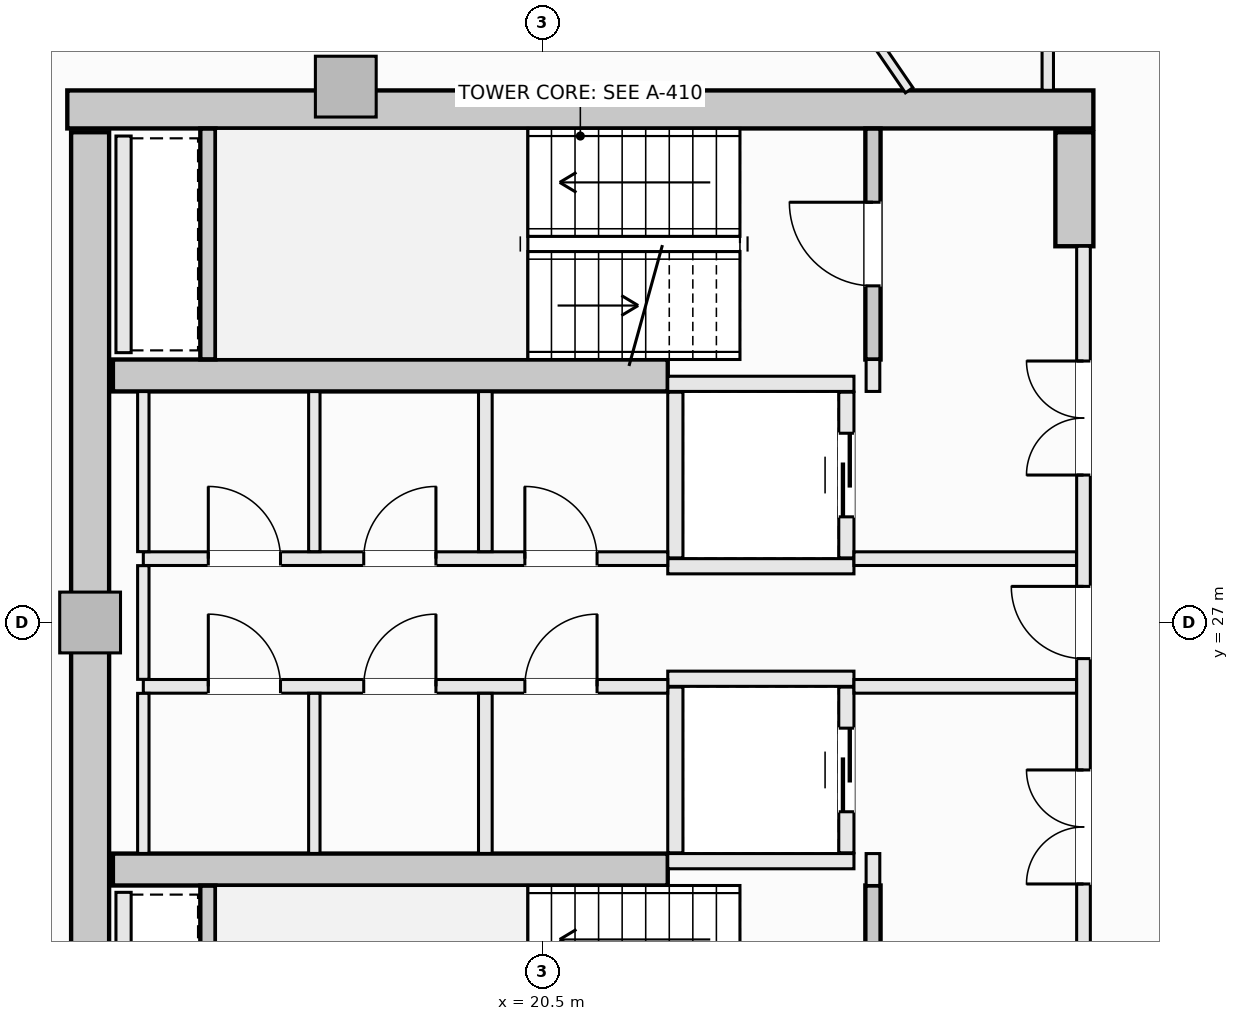
"""IFC4 building model, lengths in metres.
Left out: names, types, materials, properties, quantities, classifications, styles, units other than length and angle.
Written with IfcOpenShell. Run it as: python <this file> out.ifc"""

import sys

from ifc_helpers import new_model, si_unit, direction, frame, frame_2d, origin, origin_2d, place, context, subcontext, project, spatial, rectangle, extrude, element, fill, save


model = new_model("IFC4")
c1 = context("Model", 3, precision=1e-05, world=origin(), true_north=direction((0.0, 1.0)))
c2 = subcontext(c1, "Body", "Model", "MODEL_VIEW")
j1 = project(units=[si_unit("LENGTHUNIT", "METRE"), si_unit("PLANEANGLEUNIT", "RADIAN")], contexts=[c1])
p1 = place(None, origin())
s1 = spatial("IfcSite", under=j1, at=p1, CompositionType="ELEMENT")
p2 = place(p1, origin())
s2 = spatial("IfcBuilding", under=s1, at=p2, CompositionType="ELEMENT")
p3 = place(p2, frame((0.0, 0.0, 206.3)))
s3 = spatial("IfcBuildingStorey", under=s2, at=p3, CompositionType="ELEMENT", Elevation=206.3)
p4 = place(p3, frame((14.25, 33.75, -0.27), z_axis=(0.0, 0.0, 1.0), x_axis=(1.0, 0.0, 0.0)))
e1 = element("IfcWall", 1, at=p4, inside=s3, PredefinedType="SHEAR", context=c2, shape_type="SweptSolid", body=[
    extrude(rectangle(XDim=13.5, YDim=0.5, at=frame_2d((6.75, 0.0))), origin(), (0.0, 0.0, 1.0), 3.3),
])
p5 = place(p3, frame((14.55, 20.55, -0.27), z_axis=(0.0, 0.0, 1.0), x_axis=(0.0, 1.0, 0.0)))
e2 = element("IfcWall", 2, at=p5, inside=s3, PredefinedType="SHEAR", context=c2, shape_type="SweptSolid", body=[
    extrude(rectangle(XDim=12.9, YDim=0.5, at=frame_2d((6.45, 0.0))), origin(), (0.0, 0.0, 1.0), 3.3),
])
p6 = place(p3, frame((27.5, 31.95, -0.27), z_axis=(0.0, 0.0, 1.0), x_axis=(0.0, 1.0, 0.0)))
e3 = element("IfcWall", 3, at=p6, inside=s3, PredefinedType="SHEAR", context=c2, shape_type="SweptSolid", body=[
    extrude(rectangle(XDim=1.5, YDim=0.5, at=frame_2d((0.75, 0.0))), origin(), (0.0, 0.0, 1.0), 3.3),
])
for number, where, z_axis, x_axis in (
    (4, (14.85, 30.25, -0.27), (0.0, 0.0, 1.0), (1.0, 0.0, 0.0)),
    (5, (14.85, 23.75, -0.27), (0.0, 0.0, 1.0), (1.0, 0.0, 0.0)),
):
    element("IfcWall", number, at=place(p3, frame(where, z_axis=z_axis, x_axis=x_axis)), inside=s3, PredefinedType="SHEAR", context=c2, shape_type="SweptSolid", body=[
        extrude(rectangle(XDim=7.3, YDim=0.42, at=frame_2d((3.65, 0.0))), origin(), (0.0, 0.0, 1.0), 3.3),
    ])
for number, where, z_axis, x_axis in (
    (6, (17.914, 34.05, -0.27), (0.0, 0.0, 1.0), (1.0, 0.0, 0.0)),
    (7, (14.55, 27.0, -0.27), (0.0, 0.0, 1.0), (1.0, 0.0, 0.0)),
):
    element("IfcColumn", number, at=place(p3, frame(where, z_axis=z_axis, x_axis=x_axis)), inside=s3, PredefinedType="PILASTER", context=c2, shape_type="SweptSolid", body=[
        extrude(rectangle(XDim=0.8, YDim=0.8, at=origin_2d()), origin(), (0.0, 0.0, 1.0), 3.3),
    ])
p7 = place(p3, frame((24.85, 30.46, -0.27), z_axis=(0.0, 0.0, 1.0), x_axis=(0.0, 1.0, 0.0)))
e8 = element("IfcWall", 8, at=p7, inside=s3, PredefinedType="SHEAR", context=c2, shape_type="SweptSolid", body=[
    extrude(rectangle(XDim=3.038, YDim=0.2, at=frame_2d((1.519, 0.0))), origin(), (0.0, 0.0, 1.0), 3.3),
])
p8 = place(p7, frame((0.969, 0.0, 0.27)))
e9 = element("IfcOpeningElement", 9, at=p8, cuts=e8, PredefinedType="OPENING", context=c2, shape_type="SweptSolid", body=[
    extrude(rectangle(XDim=1.1, YDim=2.15, at=frame_2d((0.55, 1.075))), frame((0.0, 0.11, 0.0), z_axis=(0.0, -1.0, 0.0), x_axis=(1.0, 0.0, 0.0)), (0.0, 0.0, 1.0), 0.22),
])
p9 = place(p3, frame((16.1, 30.462, -0.27), z_axis=(0.0, 0.0, 1.0), x_axis=(0.0, 1.0, 0.0)))
e10 = element("IfcWall", 10, at=p9, inside=s3, PredefinedType="SHEAR", context=c2, shape_type="SweptSolid", body=[
    extrude(rectangle(XDim=3.036, YDim=0.2, at=frame_2d((1.518, 0.0))), origin(), (0.0, 0.0, 1.0), 3.3),
])
p10 = place(p3, frame((24.85, 20.502, -0.27), z_axis=(0.0, 0.0, 1.0), x_axis=(0.0, 1.0, 0.0)))
e11 = element("IfcWall", 11, at=p10, inside=s3, PredefinedType="SHEAR", context=c2, shape_type="SweptSolid", body=[
    extrude(rectangle(XDim=3.038, YDim=0.2, at=frame_2d((1.519, 0.0))), origin(), (0.0, 0.0, 1.0), 3.3),
])
p11 = place(p10, frame((0.969, 0.0, 0.27)))
e12 = element("IfcOpeningElement", 12, at=p11, cuts=e11, PredefinedType="OPENING", context=c2, shape_type="SweptSolid", body=[
    extrude(rectangle(XDim=1.1, YDim=2.15, at=frame_2d((0.55, 1.075))), frame((0.0, 0.11, 0.0), z_axis=(0.0, -1.0, 0.0), x_axis=(1.0, 0.0, 0.0)), (0.0, 0.0, 1.0), 0.22),
])
p12 = place(p3, frame((16.1, 20.502, -0.27), z_axis=(0.0, 0.0, 1.0), x_axis=(0.0, 1.0, 0.0)))
e13 = element("IfcWall", 13, at=p12, inside=s3, PredefinedType="SHEAR", context=c2, shape_type="SweptSolid", body=[
    extrude(rectangle(XDim=3.036, YDim=0.2, at=frame_2d((1.518, 0.0))), origin(), (0.0, 0.0, 1.0), 3.3),
])
for number, where, z_axis, x_axis in (
    (14, (22.15, 30.14, 0.0), (0.0, 0.0, 1.0), (1.0, 0.0, 0.0)),
    (15, (22.15, 27.74, 0.0), (0.0, 0.0, 1.0), (1.0, 0.0, 0.0)),
):
    element("IfcWall", number, at=place(p3, frame(where, z_axis=z_axis, x_axis=x_axis)), inside=s3, PredefinedType="SOLIDWALL", context=c2, shape_type="SweptSolid", body=[
        extrude(rectangle(XDim=2.45, YDim=0.2, at=frame_2d((1.225, 0.0))), origin(), (0.0, 0.0, 1.0), 3.03),
    ])
p13 = place(p3, frame((22.25, 27.85, 0.0), z_axis=(0.0, 0.0, 1.0), x_axis=(0.0, 1.0, 0.0)))
e16 = element("IfcWall", 16, at=p13, inside=s3, PredefinedType="SOLIDWALL", context=c2, shape_type="SweptSolid", body=[
    extrude(rectangle(XDim=2.18, YDim=0.2, at=frame_2d((1.09, 0.0))), origin(), (0.0, 0.0, 1.0), 3.03),
])
p14 = place(p3, frame((24.5, 27.85, 0.0), z_axis=(0.0, 0.0, 1.0), x_axis=(0.0, 1.0, 0.0)))
e17 = element("IfcWall", 17, at=p14, inside=s3, PredefinedType="SOLIDWALL", context=c2, shape_type="SweptSolid", body=[
    extrude(rectangle(XDim=2.18, YDim=0.2, at=frame_2d((1.09, 0.0))), origin(), (0.0, 0.0, 1.0), 3.03),
])
p15 = place(p14, frame((0.54, 0.0, 0.0)))
e18 = element("IfcOpeningElement", 18, at=p15, cuts=e17, PredefinedType="OPENING", context=c2, shape_type="SweptSolid", body=[
    extrude(rectangle(XDim=1.1, YDim=2.2, at=frame_2d((0.55, 1.1))), frame((0.0, 0.11, 0.0), z_axis=(0.0, -1.0, 0.0), x_axis=(1.0, 0.0, 0.0)), (0.0, 0.0, 1.0), 0.22),
])
for number, where, z_axis, x_axis in (
    (19, (22.15, 26.26, 0.0), (0.0, 0.0, 1.0), (1.0, 0.0, 0.0)),
    (20, (22.15, 23.86, 0.0), (0.0, 0.0, 1.0), (1.0, 0.0, 0.0)),
):
    element("IfcWall", number, at=place(p3, frame(where, z_axis=z_axis, x_axis=x_axis)), inside=s3, PredefinedType="SOLIDWALL", context=c2, shape_type="SweptSolid", body=[
        extrude(rectangle(XDim=2.45, YDim=0.2, at=frame_2d((1.225, 0.0))), origin(), (0.0, 0.0, 1.0), 3.03),
    ])
p16 = place(p3, frame((22.25, 23.97, 0.0), z_axis=(0.0, 0.0, 1.0), x_axis=(0.0, 1.0, 0.0)))
e21 = element("IfcWall", 21, at=p16, inside=s3, PredefinedType="SOLIDWALL", context=c2, shape_type="SweptSolid", body=[
    extrude(rectangle(XDim=2.18, YDim=0.2, at=frame_2d((1.09, 0.0))), origin(), (0.0, 0.0, 1.0), 3.03),
])
p17 = place(p3, frame((24.5, 23.97, 0.0), z_axis=(0.0, 0.0, 1.0), x_axis=(0.0, 1.0, 0.0)))
e22 = element("IfcWall", 22, at=p17, inside=s3, PredefinedType="SOLIDWALL", context=c2, shape_type="SweptSolid", body=[
    extrude(rectangle(XDim=2.18, YDim=0.2, at=frame_2d((1.09, 0.0))), origin(), (0.0, 0.0, 1.0), 3.03),
])
p18 = place(p17, frame((0.54, 0.0, 0.0)))
e23 = element("IfcOpeningElement", 23, at=p18, cuts=e22, PredefinedType="OPENING", context=c2, shape_type="SweptSolid", body=[
    extrude(rectangle(XDim=1.1, YDim=2.2, at=frame_2d((0.55, 1.1))), frame((0.0, 0.11, 0.0), z_axis=(0.0, -1.0, 0.0), x_axis=(1.0, 0.0, 0.0)), (0.0, 0.0, 1.0), 0.22),
])
for number, where, z_axis, x_axis in (
    (24, (14.99, 30.55, 0.0), (0.0, 0.0, 1.0), (0.0, 1.0, 0.0)),
    (25, (14.99, 20.6, 0.0), (0.0, 0.0, 1.0), (0.0, 1.0, 0.0)),
):
    element("IfcWall", number, at=place(p3, frame(where, z_axis=z_axis, x_axis=x_axis)), inside=s3, PredefinedType="SOLIDWALL", context=c2, shape_type="SweptSolid", body=[
        extrude(rectangle(XDim=2.85, YDim=0.2, at=frame_2d((1.425, 0.0))), origin(), (0.0, 0.0, 1.0), 3.03),
    ])
for number, where, z_axis, x_axis in (
    (26, (24.85, 23.54, 0.0), (0.0, 0.0, 1.0), (0.0, 1.0, 0.0)),
    (27, (24.85, 30.04, 0.0), (0.0, 0.0, 1.0), (0.0, 1.0, 0.0)),
):
    element("IfcWall", number, at=place(p3, frame(where, z_axis=z_axis, x_axis=x_axis)), inside=s3, PredefinedType="SOLIDWALL", context=c2, shape_type="SweptSolid", body=[
        extrude(rectangle(XDim=0.42, YDim=0.18, at=frame_2d((0.21, 0.0))), origin(), (0.0, 0.0, 1.0), 3.03),
    ])
p19 = place(p3, frame((27.62, 22.05, 0.0), z_axis=(0.0, 0.0, 1.0), x_axis=(0.0, 1.0, 0.0)))
e28 = element("IfcWall", 28, at=p19, inside=s3, PredefinedType="SOLIDWALL", context=c2, shape_type="SweptSolid", body=[
    extrude(rectangle(XDim=9.9, YDim=0.18, at=frame_2d((4.95, 0.0))), origin(), (0.0, 0.0, 1.0), 3.03),
])
p20 = place(p19, frame((4.475, 0.0, 0.0)))
e29 = element("IfcOpeningElement", 29, at=p20, cuts=e28, PredefinedType="OPENING", context=c2, shape_type="SweptSolid", body=[
    extrude(rectangle(XDim=0.95, YDim=2.1, at=frame_2d((0.475, 1.05))), frame((0.0, 0.1, 0.0), z_axis=(0.0, -1.0, 0.0), x_axis=(1.0, 0.0, 0.0)), (0.0, 0.0, 1.0), 0.2),
])
p21 = place(p19, frame((6.89, 0.0, 0.0)))
e30 = element("IfcOpeningElement", 30, at=p21, cuts=e28, PredefinedType="OPENING", context=c2, shape_type="SweptSolid", body=[
    extrude(rectangle(XDim=1.5, YDim=2.2, at=frame_2d((0.75, 1.1))), frame((0.0, 0.1, 0.0), z_axis=(0.0, -1.0, 0.0), x_axis=(1.0, 0.0, 0.0)), (0.0, 0.0, 1.0), 0.2),
])
p22 = place(p19, frame((1.51, 0.0, 0.0)))
e31 = element("IfcOpeningElement", 31, at=p22, cuts=e28, PredefinedType="OPENING", context=c2, shape_type="SweptSolid", body=[
    extrude(rectangle(XDim=1.5, YDim=2.2, at=frame_2d((0.75, 1.1))), frame((0.0, 0.1, 0.0), z_axis=(0.0, -1.0, 0.0), x_axis=(1.0, 0.0, 0.0)), (0.0, 0.0, 1.0), 0.2),
])
p23 = place(p3, frame((15.25, 27.84, 0.0), z_axis=(0.0, 0.0, 1.0), x_axis=(1.0, 0.0, 0.0)))
e32 = element("IfcWall", 32, at=p23, inside=s3, PredefinedType="SOLIDWALL", context=c2, shape_type="SweptSolid", body=[
    extrude(rectangle(XDim=6.9, YDim=0.18, at=frame_2d((3.45, 0.0))), origin(), (0.0, 0.0, 1.0), 3.03),
])
p24 = place(p23, frame((5.02, 0.0, 0.0)))
e33 = element("IfcOpeningElement", 33, at=p24, cuts=e32, PredefinedType="OPENING", context=c2, shape_type="SweptSolid", body=[
    extrude(rectangle(XDim=0.95, YDim=2.1, at=frame_2d((0.475, 1.05))), frame((0.0, 0.1, 0.0), z_axis=(0.0, -1.0, 0.0), x_axis=(1.0, 0.0, 0.0)), (0.0, 0.0, 1.0), 0.2),
])
p25 = place(p23, frame((0.855, 0.0, 0.0)))
e34 = element("IfcOpeningElement", 34, at=p25, cuts=e32, PredefinedType="OPENING", context=c2, shape_type="SweptSolid", body=[
    extrude(rectangle(XDim=0.95, YDim=2.1, at=frame_2d((0.475, 1.05))), frame((0.0, 0.1, 0.0), z_axis=(0.0, -1.0, 0.0), x_axis=(1.0, 0.0, 0.0)), (0.0, 0.0, 1.0), 0.2),
])
p26 = place(p23, frame((2.9, 0.0, 0.0)))
e35 = element("IfcOpeningElement", 35, at=p26, cuts=e32, PredefinedType="OPENING", context=c2, shape_type="SweptSolid", body=[
    extrude(rectangle(XDim=0.95, YDim=2.1, at=frame_2d((0.475, 1.05))), frame((0.0, 0.1, 0.0), z_axis=(0.0, -1.0, 0.0), x_axis=(1.0, 0.0, 0.0)), (0.0, 0.0, 1.0), 0.2),
])
p27 = place(p3, frame((24.6, 27.84, 0.0), z_axis=(0.0, 0.0, 1.0), x_axis=(1.0, 0.0, 0.0)))
e36 = element("IfcWall", 36, at=p27, inside=s3, PredefinedType="SOLIDWALL", context=c2, shape_type="SweptSolid", body=[
    extrude(rectangle(XDim=2.928, YDim=0.18, at=frame_2d((1.464, 0.0))), origin(), (0.0, 0.0, 1.0), 3.03),
])
p28 = place(p3, frame((15.25, 26.16, 0.0), z_axis=(0.0, 0.0, 1.0), x_axis=(1.0, 0.0, 0.0)))
e37 = element("IfcWall", 37, at=p28, inside=s3, PredefinedType="SOLIDWALL", context=c2, shape_type="SweptSolid", body=[
    extrude(rectangle(XDim=6.9, YDim=0.18, at=frame_2d((3.45, 0.0))), origin(), (0.0, 0.0, 1.0), 3.03),
])
p29 = place(p28, frame((5.02, 0.0, 0.0)))
e38 = element("IfcOpeningElement", 38, at=p29, cuts=e37, PredefinedType="OPENING", context=c2, shape_type="SweptSolid", body=[
    extrude(rectangle(XDim=0.95, YDim=2.1, at=frame_2d((0.475, 1.05))), frame((0.0, 0.1, 0.0), z_axis=(0.0, -1.0, 0.0), x_axis=(1.0, 0.0, 0.0)), (0.0, 0.0, 1.0), 0.2),
])
p30 = place(p28, frame((0.855, 0.0, 0.0)))
e39 = element("IfcOpeningElement", 39, at=p30, cuts=e37, PredefinedType="OPENING", context=c2, shape_type="SweptSolid", body=[
    extrude(rectangle(XDim=0.95, YDim=2.1, at=frame_2d((0.475, 1.05))), frame((0.0, 0.1, 0.0), z_axis=(0.0, -1.0, 0.0), x_axis=(1.0, 0.0, 0.0)), (0.0, 0.0, 1.0), 0.2),
])
p31 = place(p28, frame((2.9, 0.0, 0.0)))
e40 = element("IfcOpeningElement", 40, at=p31, cuts=e37, PredefinedType="OPENING", context=c2, shape_type="SweptSolid", body=[
    extrude(rectangle(XDim=0.95, YDim=2.1, at=frame_2d((0.475, 1.05))), frame((0.0, 0.1, 0.0), z_axis=(0.0, -1.0, 0.0), x_axis=(1.0, 0.0, 0.0)), (0.0, 0.0, 1.0), 0.2),
])
p32 = place(p3, frame((24.6, 26.16, 0.0), z_axis=(0.0, 0.0, 1.0), x_axis=(1.0, 0.0, 0.0)))
e41 = element("IfcWall", 41, at=p32, inside=s3, PredefinedType="SOLIDWALL", context=c2, shape_type="SweptSolid", body=[
    extrude(rectangle(XDim=2.928, YDim=0.18, at=frame_2d((1.464, 0.0))), origin(), (0.0, 0.0, 1.0), 3.03),
])
p33 = place(p3, frame((15.25, 23.962, 0.0), z_axis=(0.0, 0.0, 1.0), x_axis=(0.0, 1.0, 0.0)))
e42 = element("IfcWall", 42, at=p33, inside=s3, PredefinedType="PARTITIONING", context=c2, shape_type="SweptSolid", body=[
    extrude(rectangle(XDim=2.106, YDim=0.15, at=frame_2d((1.053, 0.0))), origin(), (0.0, 0.0, 1.0), 3.03),
])
p34 = place(p3, frame((15.25, 26.252, 0.0), z_axis=(0.0, 0.0, 1.0), x_axis=(0.0, 1.0, 0.0)))
e43 = element("IfcWall", 43, at=p34, inside=s3, PredefinedType="PARTITIONING", context=c2, shape_type="SweptSolid", body=[
    extrude(rectangle(XDim=1.496, YDim=0.15, at=frame_2d((0.748, 0.0))), origin(), (0.0, 0.0, 1.0), 3.03),
])
p35 = place(p3, frame((15.25, 27.932, 0.0), z_axis=(0.0, 0.0, 1.0), x_axis=(0.0, 1.0, 0.0)))
e44 = element("IfcWall", 44, at=p35, inside=s3, PredefinedType="PARTITIONING", context=c2, shape_type="SweptSolid", body=[
    extrude(rectangle(XDim=2.106, YDim=0.15, at=frame_2d((1.053, 0.0))), origin(), (0.0, 0.0, 1.0), 3.03),
])
for number, where, z_axis, x_axis in (
    (45, (19.75, 23.962, 0.0), (0.0, 0.0, 1.0), (0.0, 1.0, 0.0)),
    (46, (19.75, 27.932, 0.0), (0.0, 0.0, 1.0), (0.0, 1.0, 0.0)),
):
    element("IfcWall", number, at=place(p3, frame(where, z_axis=z_axis, x_axis=x_axis)), inside=s3, PredefinedType="SOLIDWALL", context=c2, shape_type="SweptSolid", body=[
        extrude(rectangle(XDim=2.106, YDim=0.18, at=frame_2d((1.053, 0.0))), origin(), (0.0, 0.0, 1.0), 3.03),
    ])
for number, where, z_axis, x_axis in (
    (47, (17.5, 23.962, 0.0), (0.0, 0.0, 1.0), (0.0, 1.0, 0.0)),
    (48, (17.5, 27.932, 0.0), (0.0, 0.0, 1.0), (0.0, 1.0, 0.0)),
):
    element("IfcWall", number, at=place(p3, frame(where, z_axis=z_axis, x_axis=x_axis)), inside=s3, PredefinedType="PARTITIONING", context=c2, shape_type="SweptSolid", body=[
        extrude(rectangle(XDim=2.106, YDim=0.15, at=frame_2d((1.053, 0.0))), origin(), (0.0, 0.0, 1.0), 3.03),
    ])
p36 = place(p3, frame((27.15, 34.002, 0.0), z_axis=(0.0, 0.0, 1.0), x_axis=(0.0, 1.0, 0.0)))
e49 = element("IfcWall", 49, at=p36, inside=s3, PredefinedType="PARTITIONING", context=c2, shape_type="SweptSolid", body=[
    extrude(rectangle(XDim=4.198, YDim=0.15, at=frame_2d((2.099, 0.0))), origin(), (0.0, 0.0, 1.0), 3.03),
])
p37 = place(p36, frame((1.998, 0.0, 0.0)))
e50 = element("IfcOpeningElement", 50, at=p37, cuts=e49, PredefinedType="OPENING", context=c2, shape_type="SweptSolid", body=[
    extrude(rectangle(XDim=0.95, YDim=2.1, at=frame_2d((0.475, 1.05))), frame((0.0, 0.085, 0.0), z_axis=(0.0, -1.0, 0.0), x_axis=(1.0, 0.0, 0.0)), (0.0, 0.0, 1.0), 0.17),
])
p38 = place(p3, frame((24.586, 35.083, 0.0), z_axis=(0.0, 0.0, 1.0), x_axis=(0.565231440294, -0.824932372321, 0.0)))
e51 = element("IfcWall", 51, at=p38, inside=s3, PredefinedType="PARTITIONING", context=c2, shape_type="SweptSolid", body=[
    extrude(rectangle(XDim=1.311, YDim=0.12, at=frame_2d((0.655, 0.0))), origin(), (0.0, 0.0, 1.0), 3.03),
])
p39 = place(p8, origin())
e52 = element("IfcDoor", 52, at=p39, inside=s3, OperationType="SINGLE_SWING_RIGHT", PredefinedType="DOOR", context=c2, shape_type="SweptSolid", body=[
    extrude(rectangle(XDim=1.1, YDim=2.15, at=frame_2d((0.55, 1.075))), frame((0.0, 0.025, 0.0), z_axis=(0.0, -1.0, 0.0), x_axis=(1.0, 0.0, 0.0)), (0.0, 0.0, 1.0), 0.05),
])
fill(e9, e52)
p40 = place(p15, origin())
e53 = element("IfcDoor", 53, at=p40, inside=s3, OperationType="SLIDING_TO_LEFT", PredefinedType="DOOR", context=c2, shape_type="SweptSolid", body=[
    extrude(rectangle(XDim=1.1, YDim=2.2, at=frame_2d((0.55, 1.1))), frame((0.0, 0.025, 0.0), z_axis=(0.0, -1.0, 0.0), x_axis=(1.0, 0.0, 0.0)), (0.0, 0.0, 1.0), 0.05),
])
fill(e18, e53)
p41 = place(p18, origin())
e54 = element("IfcDoor", 54, at=p41, inside=s3, OperationType="SLIDING_TO_LEFT", PredefinedType="DOOR", context=c2, shape_type="SweptSolid", body=[
    extrude(rectangle(XDim=1.1, YDim=2.2, at=frame_2d((0.55, 1.1))), frame((0.0, 0.025, 0.0), z_axis=(0.0, -1.0, 0.0), x_axis=(1.0, 0.0, 0.0)), (0.0, 0.0, 1.0), 0.05),
])
fill(e23, e54)
p42 = place(p20, origin())
e55 = element("IfcDoor", 55, at=p42, inside=s3, OperationType="SINGLE_SWING_RIGHT", PredefinedType="DOOR", context=c2, shape_type="SweptSolid", body=[
    extrude(rectangle(XDim=0.95, YDim=2.1, at=frame_2d((0.475, 1.05))), frame((0.0, 0.025, 0.0), z_axis=(0.0, -1.0, 0.0), x_axis=(1.0, 0.0, 0.0)), (0.0, 0.0, 1.0), 0.05),
])
fill(e29, e55)
p43 = place(p21, origin())
e56 = element("IfcDoor", 56, at=p43, inside=s3, OperationType="DOUBLE_DOOR_SINGLE_SWING", PredefinedType="DOOR", context=c2, shape_type="SweptSolid", body=[
    extrude(rectangle(XDim=1.5, YDim=2.2, at=frame_2d((0.75, 1.1))), frame((0.0, 0.025, 0.0), z_axis=(0.0, -1.0, 0.0), x_axis=(1.0, 0.0, 0.0)), (0.0, 0.0, 1.0), 0.05),
])
fill(e30, e56)
p44 = place(p22, origin())
e57 = element("IfcDoor", 57, at=p44, inside=s3, OperationType="DOUBLE_DOOR_SINGLE_SWING", PredefinedType="DOOR", context=c2, shape_type="SweptSolid", body=[
    extrude(rectangle(XDim=1.5, YDim=2.2, at=frame_2d((0.75, 1.1))), frame((0.0, 0.025, 0.0), z_axis=(0.0, -1.0, 0.0), x_axis=(1.0, 0.0, 0.0)), (0.0, 0.0, 1.0), 0.05),
])
fill(e31, e57)
p45 = place(p24, origin())
e58 = element("IfcDoor", 58, at=p45, inside=s3, OperationType="SINGLE_SWING_LEFT", PredefinedType="DOOR", context=c2, shape_type="SweptSolid", body=[
    extrude(rectangle(XDim=0.95, YDim=2.1, at=frame_2d((0.475, 1.05))), frame((0.0, 0.025, 0.0), z_axis=(0.0, -1.0, 0.0), x_axis=(1.0, 0.0, 0.0)), (0.0, 0.0, 1.0), 0.05),
])
fill(e33, e58)
p46 = place(p29, origin())
e59 = element("IfcDoor", 59, at=p46, inside=s3, OperationType="SINGLE_SWING_RIGHT", PredefinedType="DOOR", context=c2, shape_type="SweptSolid", body=[
    extrude(rectangle(XDim=0.95, YDim=2.1, at=frame_2d((0.475, 1.05))), frame((0.0, 0.025, 0.0), z_axis=(0.0, -1.0, 0.0), x_axis=(1.0, 0.0, 0.0)), (0.0, 0.0, 1.0), 0.05),
])
fill(e38, e59)
p47 = place(p25, origin())
e60 = element("IfcDoor", 60, at=p47, inside=s3, OperationType="SINGLE_SWING_LEFT", PredefinedType="DOOR", context=c2, shape_type="SweptSolid", body=[
    extrude(rectangle(XDim=0.95, YDim=2.1, at=frame_2d((0.475, 1.05))), frame((0.0, 0.025, 0.0), z_axis=(0.0, -1.0, 0.0), x_axis=(1.0, 0.0, 0.0)), (0.0, 0.0, 1.0), 0.05),
])
fill(e34, e60)
p48 = place(p26, origin())
e61 = element("IfcDoor", 61, at=p48, inside=s3, OperationType="SINGLE_SWING_RIGHT", PredefinedType="DOOR", context=c2, shape_type="SweptSolid", body=[
    extrude(rectangle(XDim=0.95, YDim=2.1, at=frame_2d((0.475, 1.05))), frame((0.0, 0.025, 0.0), z_axis=(0.0, -1.0, 0.0), x_axis=(1.0, 0.0, 0.0)), (0.0, 0.0, 1.0), 0.05),
])
fill(e35, e61)
p49 = place(p30, origin())
e62 = element("IfcDoor", 62, at=p49, inside=s3, OperationType="SINGLE_SWING_LEFT", PredefinedType="DOOR", context=c2, shape_type="SweptSolid", body=[
    extrude(rectangle(XDim=0.95, YDim=2.1, at=frame_2d((0.475, 1.05))), frame((0.0, 0.025, 0.0), z_axis=(0.0, -1.0, 0.0), x_axis=(1.0, 0.0, 0.0)), (0.0, 0.0, 1.0), 0.05),
])
fill(e39, e62)
p50 = place(p31, origin())
e63 = element("IfcDoor", 63, at=p50, inside=s3, OperationType="SINGLE_SWING_RIGHT", PredefinedType="DOOR", context=c2, shape_type="SweptSolid", body=[
    extrude(rectangle(XDim=0.95, YDim=2.1, at=frame_2d((0.475, 1.05))), frame((0.0, 0.025, 0.0), z_axis=(0.0, -1.0, 0.0), x_axis=(1.0, 0.0, 0.0)), (0.0, 0.0, 1.0), 0.05),
])
fill(e40, e63)
save(model, sys.argv[1])
